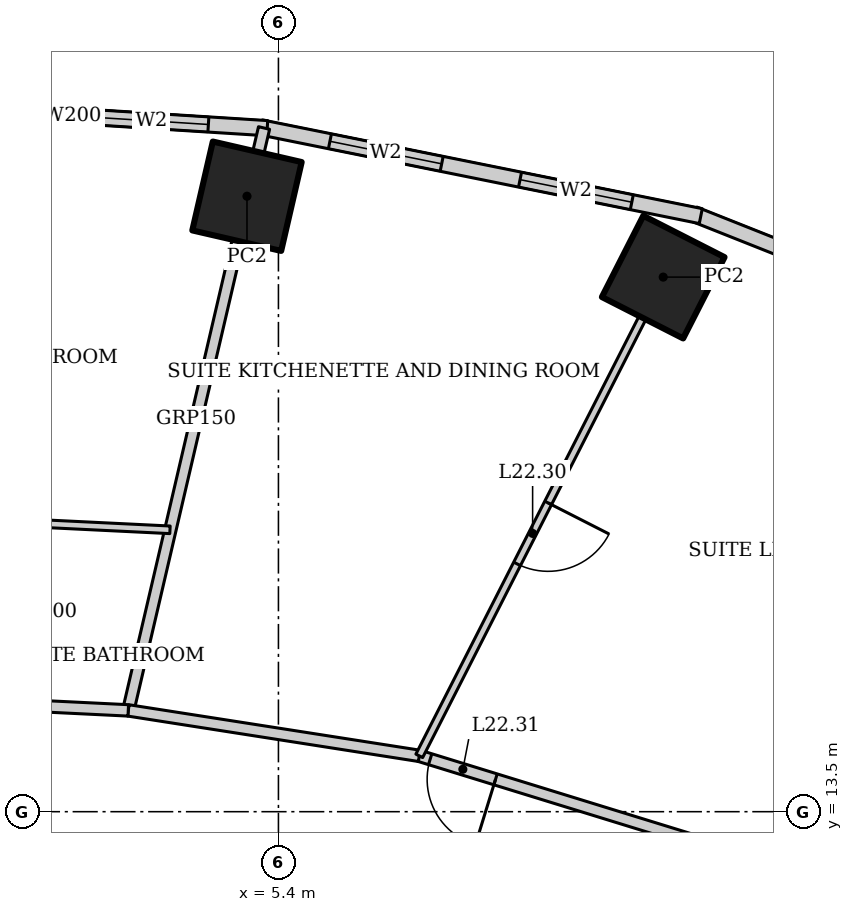
"""IFC4 building model, lengths in metres.
Left out: names, types, materials, properties, quantities, classifications, styles, units other than length and angle.
Written with IfcOpenShell. Run it as: python <this file> out.ifc"""

import sys

from ifc_helpers import new_model, si_unit, direction, frame, frame_2d, origin, origin_2d, place, context, subcontext, project, spatial, rectangle, hollow_rectangle, extrude, element, fill, save


model = new_model("IFC4")
c1 = context("Model", 3, precision=1e-05, world=origin(), true_north=direction((0.0, 1.0)))
c2 = subcontext(c1, "Body", "Model", "MODEL_VIEW")
j1 = project(units=[si_unit("LENGTHUNIT", "METRE"), si_unit("PLANEANGLEUNIT", "RADIAN")], contexts=[c1])
p1 = place(None, origin())
s1 = spatial("IfcSite", under=j1, at=p1, CompositionType="ELEMENT")
p2 = place(p1, origin())
s2 = spatial("IfcBuilding", under=s1, at=p2, CompositionType="ELEMENT")
p3 = place(p2, frame((0.0, 0.0, 94.6)))
s3 = spatial("IfcBuildingStorey", under=s2, at=p3, CompositionType="ELEMENT", Elevation=94.6)
for number, where, z_axis, x_axis in (
    (1, (10.463, 20.534, 0.0), (0.0, 0.0, 1.0), (0.454, 0.891, 0.0)),
    (2, (4.986, 21.598, 0.0), (0.0, 0.0, 1.0), (0.225, 0.974, 0.0)),
):
    element("IfcColumn", number, at=place(p3, frame(where, z_axis=z_axis, x_axis=x_axis)), inside=s3, PredefinedType="COLUMN", context=c2, shape_type="SweptSolid", body=[
        extrude(hollow_rectangle(XDim=1.2, YDim=1.2, WallThickness=0.1, at=origin_2d()), origin(), (0.0, 0.0, 1.0), 3.6),
    ])
p4 = place(p3, frame((18.018, 18.523, 0.0), z_axis=(0.0, 0.0, 1.0), x_axis=(-0.929358351251, 0.369178892895, 0.0)))
e3 = element("IfcWall", 3, at=p4, inside=s3, PredefinedType="SOLIDWALL", context=c2, shape_type="SweptSolid", body=[
    extrude(rectangle(XDim=7.692, YDim=0.2, at=frame_2d((3.846, 0.0))), origin(), (0.0, 0.0, 1.0), 3.45),
])
p5 = place(p4, frame((1.373, 0.0, 0.5)))
e4 = element("IfcOpeningElement", 4, at=p5, cuts=e3, PredefinedType="OPENING", context=c2, shape_type="SweptSolid", body=[
    extrude(rectangle(XDim=1.5, YDim=2.2, at=frame_2d((0.75, 1.1))), frame((0.0, 0.11, 0.0), z_axis=(0.0, -1.0, 0.0), x_axis=(1.0, 0.0, 0.0)), (0.0, 0.0, 1.0), 0.22),
])
p6 = place(p4, frame((4.819, 0.0, 0.5)))
e5 = element("IfcOpeningElement", 5, at=p6, cuts=e3, PredefinedType="OPENING", context=c2, shape_type="SweptSolid", body=[
    extrude(rectangle(XDim=1.5, YDim=2.2, at=frame_2d((0.75, 1.1))), frame((0.0, 0.11, 0.0), z_axis=(0.0, -1.0, 0.0), x_axis=(1.0, 0.0, 0.0)), (0.0, 0.0, 1.0), 0.22),
])
p7 = place(p3, frame((10.957, 21.337, 0.0), z_axis=(0.0, 0.0, 1.0), x_axis=(-0.980251657452, 0.197754110105, 0.0)))
e6 = element("IfcWall", 6, at=p7, inside=s3, PredefinedType="SOLIDWALL", context=c2, shape_type="SweptSolid", body=[
    extrude(rectangle(XDim=5.904, YDim=0.2, at=frame_2d((2.952, 0.0))), origin(), (0.0, 0.0, 1.0), 3.45),
])
p8 = place(p7, frame((0.926, 0.0, 0.5)))
e7 = element("IfcOpeningElement", 7, at=p8, cuts=e6, PredefinedType="OPENING", context=c2, shape_type="SweptSolid", body=[
    extrude(rectangle(XDim=1.5, YDim=2.2, at=frame_2d((0.75, 1.1))), frame((0.0, 0.11, 0.0), z_axis=(0.0, -1.0, 0.0), x_axis=(1.0, 0.0, 0.0)), (0.0, 0.0, 1.0), 0.22),
])
p9 = place(p7, frame((3.478, 0.0, 0.5)))
e8 = element("IfcOpeningElement", 8, at=p9, cuts=e6, PredefinedType="OPENING", context=c2, shape_type="SweptSolid", body=[
    extrude(rectangle(XDim=1.5, YDim=2.2, at=frame_2d((0.75, 1.1))), frame((0.0, 0.11, 0.0), z_axis=(0.0, -1.0, 0.0), x_axis=(1.0, 0.0, 0.0)), (0.0, 0.0, 1.0), 0.22),
])
p10 = place(p3, frame((5.253, 22.493, 0.0), z_axis=(0.0, 0.0, 1.0), x_axis=(-0.998018582375, 0.062919863585, 0.0)))
e9 = element("IfcWall", 9, at=p10, inside=s3, PredefinedType="SOLIDWALL", context=c2, shape_type="SweptSolid", body=[
    extrude(rectangle(XDim=5.304, YDim=0.2, at=frame_2d((2.652, 0.0))), origin(), (0.0, 0.0, 1.0), 3.45),
])
p11 = place(p10, frame((0.776, 0.0, 0.5)))
e10 = element("IfcOpeningElement", 10, at=p11, cuts=e9, PredefinedType="OPENING", context=c2, shape_type="SweptSolid", body=[
    extrude(rectangle(XDim=1.5, YDim=2.2, at=frame_2d((0.75, 1.1))), frame((0.0, 0.11, 0.0), z_axis=(0.0, -1.0, 0.0), x_axis=(1.0, 0.0, 0.0)), (0.0, 0.0, 1.0), 0.22),
])
p12 = place(p10, frame((3.028, 0.0, 0.5)))
e11 = element("IfcOpeningElement", 11, at=p12, cuts=e9, PredefinedType="OPENING", context=c2, shape_type="SweptSolid", body=[
    extrude(rectangle(XDim=1.5, YDim=2.2, at=frame_2d((0.75, 1.1))), frame((0.0, 0.11, 0.0), z_axis=(0.0, -1.0, 0.0), x_axis=(1.0, 0.0, 0.0)), (0.0, 0.0, 1.0), 0.22),
])
p13 = place(p3, frame((5.211, 22.496, 0.0), z_axis=(0.0, 0.0, 1.0), x_axis=(-0.227056984461, -0.973881474209, 0.0)))
e12 = element("IfcWall", 12, at=p13, inside=s3, PredefinedType="PARTITIONING", context=c2, shape_type="SweptSolid", body=[
    extrude(rectangle(XDim=7.869, YDim=0.15, at=frame_2d((3.934, 0.0))), origin(), (0.0, 0.0, 1.0), 2.767),
])
p14 = place(p3, frame((12.257, 12.693, 0.0), z_axis=(0.0, 0.0, 1.0), x_axis=(-0.955657956744, 0.294478980085, 0.0)))
e13 = element("IfcWall", 13, at=p14, inside=s3, PredefinedType="PARTITIONING", context=c2, shape_type="SweptSolid", body=[
    extrude(rectangle(XDim=5.236, YDim=0.15, at=frame_2d((2.618, 0.0))), origin(), (0.0, 0.0, 1.0), 3.45),
])
p15 = place(p14, frame((4.186, 0.0, 0.0)))
e14 = element("IfcOpeningElement", 14, at=p15, cuts=e13, PredefinedType="OPENING", context=c2, shape_type="SweptSolid", body=[
    extrude(rectangle(XDim=0.9, YDim=2.1, at=frame_2d((0.45, 1.05))), frame((0.0, 0.085, 0.0), z_axis=(0.0, -1.0, 0.0), x_axis=(1.0, 0.0, 0.0)), (0.0, 0.0, 1.0), 0.17),
])
p16 = place(p3, frame((7.253, 14.235, 0.0), z_axis=(0.0, 0.0, 1.0), x_axis=(-0.988015036573, 0.154357660987, 0.0)))
e15 = element("IfcWall", 15, at=p16, inside=s3, PredefinedType="PARTITIONING", context=c2, shape_type="SweptSolid", body=[
    extrude(rectangle(XDim=3.875, YDim=0.15, at=frame_2d((1.938, 0.0))), origin(), (0.0, 0.0, 1.0), 3.45),
])
p17 = place(p3, frame((3.424, 14.833, 0.0), z_axis=(0.0, 0.0, 1.0), x_axis=(-0.998809560203, 0.048779733975, 0.0)))
e16 = element("IfcWall", 16, at=p17, inside=s3, PredefinedType="PARTITIONING", context=c2, shape_type="SweptSolid", body=[
    extrude(rectangle(XDim=3.428, YDim=0.15, at=frame_2d((1.714, 0.0))), origin(), (0.0, 0.0, 1.0), 3.45),
])
p18 = place(p3, frame((10.236, 20.088, 0.0), z_axis=(0.0, 0.0, 1.0), x_axis=(-0.453993694696, -0.89100489627, 0.0)))
e17 = element("IfcWall", 17, at=p18, inside=s3, PredefinedType="PARTITIONING", context=c2, shape_type="SweptSolid", body=[
    extrude(rectangle(XDim=6.57, YDim=0.1, at=frame_2d((3.285, 0.0))), origin(), (0.0, 0.0, 1.0), 2.528),
])
p19 = place(p18, frame((2.835, 0.0, 0.0)))
e18 = element("IfcOpeningElement", 18, at=p19, cuts=e17, PredefinedType="OPENING", context=c2, shape_type="SweptSolid", body=[
    extrude(rectangle(XDim=0.9, YDim=2.1, at=frame_2d((0.45, 1.05))), frame((0.0, 0.06, 0.0), z_axis=(0.0, -1.0, 0.0), x_axis=(1.0, 0.0, 0.0)), (0.0, 0.0, 1.0), 0.12),
])
p20 = place(p3, frame((1.544, 17.327, 0.0), z_axis=(0.0, 0.0, 1.0), x_axis=(0.998813899717, -0.048690797202, 0.0)))
e19 = element("IfcWall", 19, at=p20, inside=s3, PredefinedType="PARTITIONING", context=c2, shape_type="SweptSolid", body=[
    extrude(rectangle(XDim=2.432, YDim=0.1, at=frame_2d((1.216, 0.0))), origin(), (0.0, 0.0, 1.0), 3.45),
])
p21 = place(p8, origin())
e20 = element("IfcWindow", 20, at=p21, inside=s3, PartitioningType="SINGLE_PANEL", PredefinedType="WINDOW", context=c2, shape_type="SweptSolid", body=[
    extrude(rectangle(XDim=1.5, YDim=2.2, at=frame_2d((0.75, 1.1))), frame((0.0, 0.03, 0.0), z_axis=(0.0, -1.0, 0.0), x_axis=(1.0, 0.0, 0.0)), (0.0, 0.0, 1.0), 0.06),
])
fill(e7, e20)
p22 = place(p9, origin())
e21 = element("IfcWindow", 21, at=p22, inside=s3, PartitioningType="SINGLE_PANEL", PredefinedType="WINDOW", context=c2, shape_type="SweptSolid", body=[
    extrude(rectangle(XDim=1.5, YDim=2.2, at=frame_2d((0.75, 1.1))), frame((0.0, 0.03, 0.0), z_axis=(0.0, -1.0, 0.0), x_axis=(1.0, 0.0, 0.0)), (0.0, 0.0, 1.0), 0.06),
])
fill(e8, e21)
p23 = place(p11, origin())
e22 = element("IfcWindow", 22, at=p23, inside=s3, PartitioningType="SINGLE_PANEL", PredefinedType="WINDOW", context=c2, shape_type="SweptSolid", body=[
    extrude(rectangle(XDim=1.5, YDim=2.2, at=frame_2d((0.75, 1.1))), frame((0.0, 0.03, 0.0), z_axis=(0.0, -1.0, 0.0), x_axis=(1.0, 0.0, 0.0)), (0.0, 0.0, 1.0), 0.06),
])
fill(e10, e22)
p24 = place(p19, origin())
e23 = element("IfcDoor", 23, at=p24, inside=s3, OperationType="SINGLE_SWING_LEFT", PredefinedType="DOOR", context=c2, shape_type="SweptSolid", body=[
    extrude(rectangle(XDim=0.9, YDim=2.1, at=frame_2d((0.45, 1.05))), frame((0.0, 0.025, 0.0), z_axis=(0.0, -1.0, 0.0), x_axis=(1.0, 0.0, 0.0)), (0.0, 0.0, 1.0), 0.05),
])
fill(e18, e23)
p25 = place(p15, origin())
e24 = element("IfcDoor", 24, at=p25, inside=s3, OperationType="SINGLE_SWING_LEFT", PredefinedType="DOOR", context=c2, shape_type="SweptSolid", body=[
    extrude(rectangle(XDim=0.9, YDim=2.1, at=frame_2d((0.45, 1.05))), frame((0.0, 0.025, 0.0), z_axis=(0.0, -1.0, 0.0), x_axis=(1.0, 0.0, 0.0)), (0.0, 0.0, 1.0), 0.05),
])
fill(e14, e24)
save(model, sys.argv[1])
